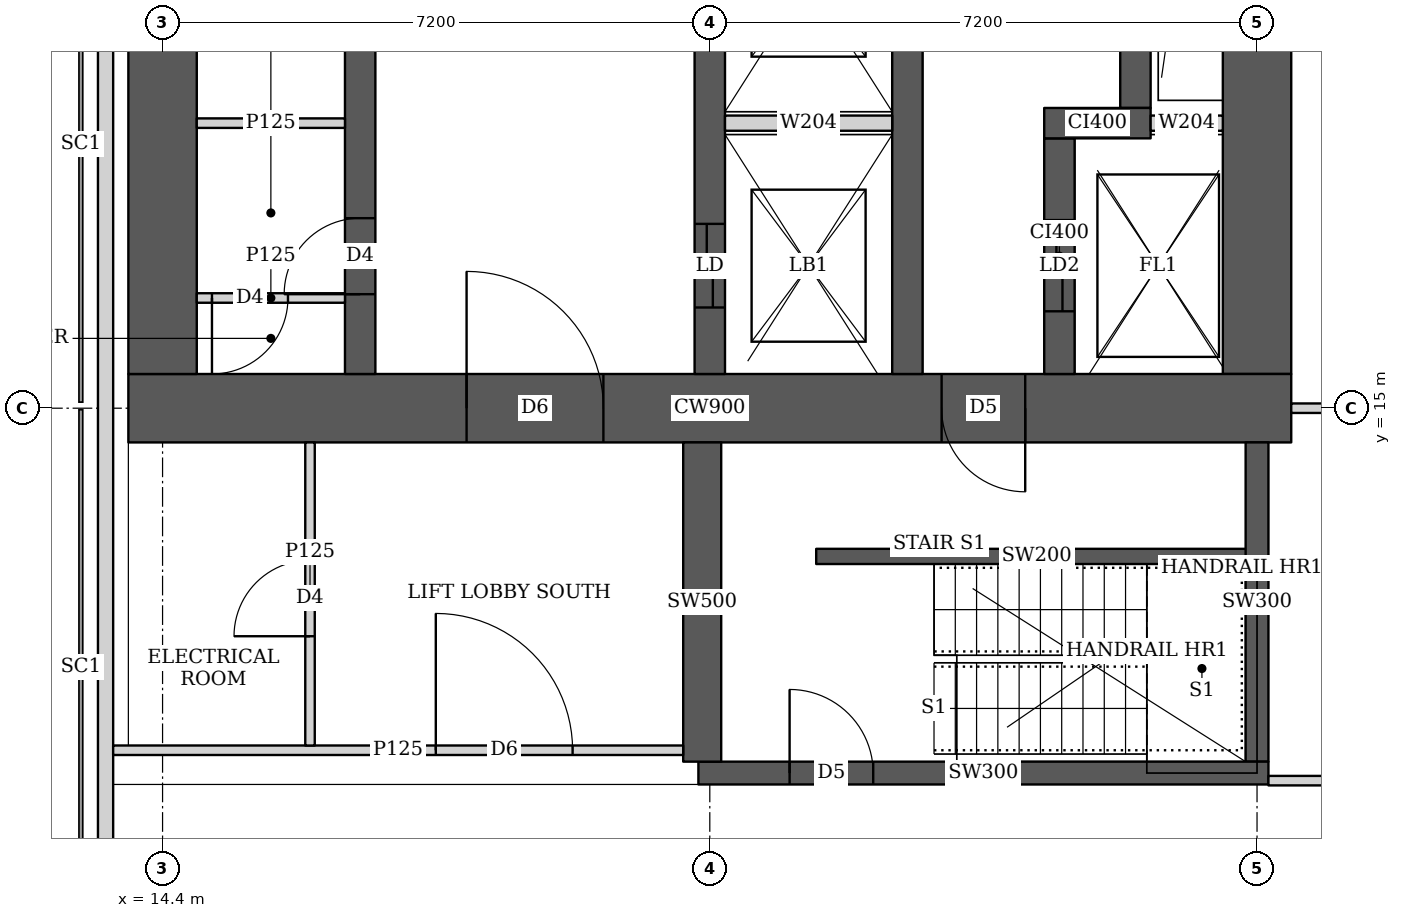
"""IFC4 building model, lengths in metres.
Left out: names, types, materials, properties, quantities, classifications, styles, units other than length and angle.
Written with IfcOpenShell. Run it as: python <this file> out.ifc"""

import sys

from ifc_helpers import new_model, si_unit, direction, frame, frame_2d, origin, place, context, subcontext, project, spatial, rectangle, extrude, element, fill, save


model = new_model("IFC4")
c1 = context("Model", 3, precision=1e-05, world=origin(), true_north=direction((0.0, 1.0)))
c2 = subcontext(c1, "Body", "Model", "MODEL_VIEW")
j1 = project(units=[si_unit("LENGTHUNIT", "METRE"), si_unit("PLANEANGLEUNIT", "RADIAN")], contexts=[c1])
p1 = place(None, origin())
s1 = spatial("IfcSite", under=j1, at=p1, CompositionType="ELEMENT")
p2 = place(p1, origin())
s2 = spatial("IfcBuilding", under=s1, at=p2, CompositionType="ELEMENT")
p3 = place(p2, frame((0.0, 0.0, 262.85)))
s3 = spatial("IfcBuildingStorey", under=s2, at=p3, CompositionType="ELEMENT", Elevation=262.85)
p4 = place(p3, frame((13.95, 15.0, 0.0), z_axis=(0.0, 0.0, 1.0), x_axis=(1.0, 0.0, 0.0)))
e1 = element("IfcWall", 1, at=p4, inside=s3, PredefinedType="SHEAR", context=c2, shape_type="SweptSolid", body=[
    extrude(rectangle(XDim=15.3, YDim=0.9, at=frame_2d((7.65, 0.0))), origin(), (0.0, 0.0, 1.0), 3.75),
])
p5 = place(p4, frame((4.45, 0.0, 0.0)))
e2 = element("IfcOpeningElement", 2, at=p5, cuts=e1, PredefinedType="OPENING", context=c2, shape_type="SweptSolid", body=[
    extrude(rectangle(XDim=1.8, YDim=2.1, at=frame_2d((0.9, 1.05))), frame((0.0, 0.46, 0.0), z_axis=(0.0, -1.0, 0.0), x_axis=(1.0, 0.0, 0.0)), (0.0, 0.0, 1.0), 0.92),
])
p6 = place(p4, frame((10.7, 0.0, 0.0)))
e3 = element("IfcOpeningElement", 3, at=p6, cuts=e1, PredefinedType="OPENING", context=c2, shape_type="SweptSolid", body=[
    extrude(rectangle(XDim=1.1, YDim=2.1, at=frame_2d((0.55, 1.05))), frame((0.0, 0.46, 0.0), z_axis=(0.0, -1.0, 0.0), x_axis=(1.0, 0.0, 0.0)), (0.0, 0.0, 1.0), 0.92),
])
for number, where, z_axis, x_axis in (
    (4, (14.4, 15.45, 0.0), (0.0, 0.0, 1.0), (0.0, 1.0, 0.0)),
    (5, (28.8, 15.45, 0.0), (0.0, 0.0, 1.0), (0.0, 1.0, 0.0)),
):
    element("IfcWall", number, at=place(p3, frame(where, z_axis=z_axis, x_axis=x_axis)), inside=s3, PredefinedType="SHEAR", context=c2, shape_type="SweptSolid", body=[
        extrude(rectangle(XDim=14.1, YDim=0.9, at=frame_2d((7.05, 0.0))), origin(), (0.0, 0.0, 1.0), 3.75),
    ])
p7 = place(p3, frame((17.0, 15.45, 0.0), z_axis=(0.0, 0.0, 1.0), x_axis=(0.0, 1.0, 0.0)))
e6 = element("IfcWall", 6, at=p7, inside=s3, PredefinedType="SHEAR", context=c2, shape_type="SweptSolid", body=[
    extrude(rectangle(XDim=14.1, YDim=0.4, at=frame_2d((7.05, 0.0))), origin(), (0.0, 0.0, 1.0), 3.75),
])
p8 = place(p7, frame((1.05, 0.0, 0.0)))
e7 = element("IfcOpeningElement", 7, at=p8, cuts=e6, PredefinedType="OPENING", context=c2, shape_type="SweptSolid", body=[
    extrude(rectangle(XDim=1.0, YDim=2.1, at=frame_2d((0.5, 1.05))), frame((0.0, 0.21, 0.0), z_axis=(0.0, -1.0, 0.0), x_axis=(1.0, 0.0, 0.0)), (0.0, 0.0, 1.0), 0.42),
])
p9 = place(p7, frame((4.675, 0.0, 0.0)))
e8 = element("IfcOpeningElement", 8, at=p9, cuts=e6, PredefinedType="OPENING", context=c2, shape_type="SweptSolid", body=[
    extrude(rectangle(XDim=1.0, YDim=2.1, at=frame_2d((0.5, 1.05))), frame((0.0, 0.21, 0.0), z_axis=(0.0, -1.0, 0.0), x_axis=(1.0, 0.0, 0.0)), (0.0, 0.0, 1.0), 0.42),
])
p10 = place(p7, frame((8.425, 0.0, 0.0)))
e9 = element("IfcOpeningElement", 9, at=p10, cuts=e6, PredefinedType="OPENING", context=c2, shape_type="SweptSolid", body=[
    extrude(rectangle(XDim=1.0, YDim=2.1, at=frame_2d((0.5, 1.05))), frame((0.0, 0.21, 0.0), z_axis=(0.0, -1.0, 0.0), x_axis=(1.0, 0.0, 0.0)), (0.0, 0.0, 1.0), 0.42),
])
p11 = place(p7, frame((12.175, 0.0, 0.0)))
e10 = element("IfcOpeningElement", 10, at=p11, cuts=e6, PredefinedType="OPENING", context=c2, shape_type="SweptSolid", body=[
    extrude(rectangle(XDim=1.0, YDim=2.1, at=frame_2d((0.5, 1.05))), frame((0.0, 0.21, 0.0), z_axis=(0.0, -1.0, 0.0), x_axis=(1.0, 0.0, 0.0)), (0.0, 0.0, 1.0), 0.42),
])
p12 = place(p3, frame((21.6, 15.45, 0.0), z_axis=(0.0, 0.0, 1.0), x_axis=(0.0, 1.0, 0.0)))
e11 = element("IfcWall", 11, at=p12, inside=s3, PredefinedType="SHEAR", context=c2, shape_type="SweptSolid", body=[
    extrude(rectangle(XDim=14.1, YDim=0.4, at=frame_2d((7.05, 0.0))), origin(), (0.0, 0.0, 1.0), 3.75),
])
p13 = place(p12, frame((0.875, 0.0, 0.0)))
e12 = element("IfcOpeningElement", 12, at=p13, cuts=e11, PredefinedType="OPENING", context=c2, shape_type="SweptSolid", body=[
    extrude(rectangle(XDim=1.1, YDim=2.1, at=frame_2d((0.55, 1.05))), frame((0.0, 0.21, 0.0), z_axis=(0.0, -1.0, 0.0), x_axis=(1.0, 0.0, 0.0)), (0.0, 0.0, 1.0), 0.42),
])
p14 = place(p12, frame((4.625, 0.0, 0.0)))
e13 = element("IfcOpeningElement", 13, at=p14, cuts=e11, PredefinedType="OPENING", context=c2, shape_type="SweptSolid", body=[
    extrude(rectangle(XDim=1.1, YDim=2.1, at=frame_2d((0.55, 1.05))), frame((0.0, 0.21, 0.0), z_axis=(0.0, -1.0, 0.0), x_axis=(1.0, 0.0, 0.0)), (0.0, 0.0, 1.0), 0.42),
])
p15 = place(p12, frame((8.375, 0.0, 0.0)))
e14 = element("IfcOpeningElement", 14, at=p15, cuts=e11, PredefinedType="OPENING", context=c2, shape_type="SweptSolid", body=[
    extrude(rectangle(XDim=1.1, YDim=2.1, at=frame_2d((0.55, 1.05))), frame((0.0, 0.21, 0.0), z_axis=(0.0, -1.0, 0.0), x_axis=(1.0, 0.0, 0.0)), (0.0, 0.0, 1.0), 0.42),
])
p16 = place(p12, frame((12.125, 0.0, 0.0)))
e15 = element("IfcOpeningElement", 15, at=p16, cuts=e11, PredefinedType="OPENING", context=c2, shape_type="SweptSolid", body=[
    extrude(rectangle(XDim=1.1, YDim=2.1, at=frame_2d((0.55, 1.05))), frame((0.0, 0.21, 0.0), z_axis=(0.0, -1.0, 0.0), x_axis=(1.0, 0.0, 0.0)), (0.0, 0.0, 1.0), 0.42),
])
p17 = place(p3, frame((24.2, 15.45, 0.0), z_axis=(0.0, 0.0, 1.0), x_axis=(0.0, 1.0, 0.0)))
e16 = element("IfcWall", 16, at=p17, inside=s3, PredefinedType="SHEAR", context=c2, shape_type="SweptSolid", body=[
    extrude(rectangle(XDim=14.1, YDim=0.4, at=frame_2d((7.05, 0.0))), origin(), (0.0, 0.0, 1.0), 3.75),
])
p18 = place(p3, frame((26.2, 15.45, 0.0), z_axis=(0.0, 0.0, 1.0), x_axis=(0.0, 1.0, 0.0)))
e17 = element("IfcWall", 17, at=p18, inside=s3, PredefinedType="SHEAR", context=c2, shape_type="SweptSolid", body=[
    extrude(rectangle(XDim=3.1, YDim=0.4, at=frame_2d((1.55, 0.0))), origin(), (0.0, 0.0, 1.0), 3.75),
])
p19 = place(p18, frame((0.825, 0.0, 0.0)))
e18 = element("IfcOpeningElement", 18, at=p19, cuts=e17, PredefinedType="OPENING", context=c2, shape_type="SweptSolid", body=[
    extrude(rectangle(XDim=1.2, YDim=2.1, at=frame_2d((0.6, 1.05))), frame((0.0, 0.21, 0.0), z_axis=(0.0, -1.0, 0.0), x_axis=(1.0, 0.0, 0.0)), (0.0, 0.0, 1.0), 0.42),
])
p20 = place(p3, frame((26.0, 18.75, 0.0), z_axis=(0.0, 0.0, 1.0), x_axis=(1.0, 0.0, 0.0)))
e19 = element("IfcWall", 19, at=p20, inside=s3, PredefinedType="SHEAR", context=c2, shape_type="SweptSolid", body=[
    extrude(rectangle(XDim=1.4, YDim=0.4, at=frame_2d((0.7, 0.0))), origin(), (0.0, 0.0, 1.0), 3.75),
])
p21 = place(p3, frame((27.2, 18.95, 0.0), z_axis=(0.0, 0.0, 1.0), x_axis=(0.0, 1.0, 0.0)))
e20 = element("IfcWall", 20, at=p21, inside=s3, PredefinedType="SHEAR", context=c2, shape_type="SweptSolid", body=[
    extrude(rectangle(XDim=7.1, YDim=0.4, at=frame_2d((3.55, 0.0))), origin(), (0.0, 0.0, 1.0), 3.75),
])
p22 = place(p3, frame((21.45, 10.2, 0.0), z_axis=(0.0, 0.0, 1.0), x_axis=(1.0, 0.0, 0.0)))
e21 = element("IfcWall", 21, at=p22, inside=s3, PredefinedType="SHEAR", context=c2, shape_type="SweptSolid", body=[
    extrude(rectangle(XDim=7.5, YDim=0.3, at=frame_2d((3.75, 0.0))), origin(), (0.0, 0.0, 1.0), 3.75),
])
p23 = place(p22, frame((1.2, 0.0, 0.0)))
e22 = element("IfcOpeningElement", 22, at=p23, cuts=e21, PredefinedType="OPENING", context=c2, shape_type="SweptSolid", body=[
    extrude(rectangle(XDim=1.1, YDim=2.1, at=frame_2d((0.55, 1.05))), frame((0.0, 0.16, 0.0), z_axis=(0.0, -1.0, 0.0), x_axis=(1.0, 0.0, 0.0)), (0.0, 0.0, 1.0), 0.32),
])
p24 = place(p3, frame((21.5, 10.35, 0.0), z_axis=(0.0, 0.0, 1.0), x_axis=(0.0, 1.0, 0.0)))
e23 = element("IfcWall", 23, at=p24, inside=s3, PredefinedType="SHEAR", context=c2, shape_type="SweptSolid", body=[
    extrude(rectangle(XDim=4.2, YDim=0.5, at=frame_2d((2.1, 0.0))), origin(), (0.0, 0.0, 1.0), 3.75),
])
p25 = place(p3, frame((28.8, 10.35, 0.0), z_axis=(0.0, 0.0, 1.0), x_axis=(0.0, 1.0, 0.0)))
e24 = element("IfcWall", 24, at=p25, inside=s3, PredefinedType="SHEAR", context=c2, shape_type="SweptSolid", body=[
    extrude(rectangle(XDim=4.2, YDim=0.3, at=frame_2d((2.1, 0.0))), origin(), (0.0, 0.0, 1.0), 3.75),
])
p26 = place(p3, frame((13.65, 43.037, 0.0), z_axis=(0.0, 0.0, 1.0), x_axis=(0.0, -1.0, 0.0)))
e25 = element("IfcWall", 25, at=p26, inside=s3, PredefinedType="SOLIDWALL", context=c2, shape_type="SweptSolid", body=[
    extrude(rectangle(XDim=35.374, YDim=0.2, at=frame_2d((17.687, 0.0))), origin(), (0.0, 0.0, 1.0), 3.5),
])
p27 = place(p26, frame((1.959, 0.0, 0.9)))
e26 = element("IfcOpeningElement", 26, at=p27, cuts=e25, PredefinedType="OPENING", context=c2, shape_type="SweptSolid", body=[
    extrude(rectangle(XDim=1.8, YDim=1.5, at=frame_2d((0.9, 0.75))), frame((0.0, 0.11, 0.0), z_axis=(0.0, -1.0, 0.0), x_axis=(1.0, 0.0, 0.0)), (0.0, 0.0, 1.0), 0.22),
])
p28 = place(p3, frame((13.75, 10.5, 0.0), z_axis=(0.0, 0.0, 1.0), x_axis=(1.0, 0.0, 0.0)))
e27 = element("IfcWall", 27, at=p28, inside=s3, PredefinedType="PARTITIONING", context=c2, shape_type="SweptSolid", body=[
    extrude(rectangle(XDim=7.5, YDim=0.125, at=frame_2d((3.75, 0.0))), origin(), (0.0, 0.0, 1.0), 3.5),
])
p29 = place(p28, frame((4.245, 0.0, 0.0)))
e28 = element("IfcOpeningElement", 28, at=p29, cuts=e27, PredefinedType="OPENING", context=c2, shape_type="SweptSolid", body=[
    extrude(rectangle(XDim=1.8, YDim=2.1, at=frame_2d((0.9, 1.05))), frame((0.0, 0.073, 0.0), z_axis=(0.0, -1.0, 0.0), x_axis=(1.0, 0.0, 0.0)), (0.0, 0.0, 1.0), 0.145),
])
p30 = place(p3, frame((16.34, 10.562, 0.0), z_axis=(0.0, 0.0, 1.0), x_axis=(0.0, 1.0, 0.0)))
e29 = element("IfcWall", 29, at=p30, inside=s3, PredefinedType="PARTITIONING", context=c2, shape_type="SweptSolid", body=[
    extrude(rectangle(XDim=3.988, YDim=0.125, at=frame_2d((1.994, 0.0))), origin(), (0.0, 0.0, 1.0), 3.5),
])
p31 = place(p30, frame((1.438, 0.0, 0.0)))
e30 = element("IfcOpeningElement", 30, at=p31, cuts=e29, PredefinedType="OPENING", context=c2, shape_type="SweptSolid", body=[
    extrude(rectangle(XDim=1.0, YDim=2.1, at=frame_2d((0.5, 1.05))), frame((0.0, 0.073, 0.0), z_axis=(0.0, -1.0, 0.0), x_axis=(1.0, 0.0, 0.0)), (0.0, 0.0, 1.0), 0.145),
])
p32 = place(p3, frame((28.95, 10.1, 0.0), z_axis=(0.0, 0.0, 1.0), x_axis=(1.0, 0.0, 0.0)))
e31 = element("IfcWall", 31, at=p32, inside=s3, PredefinedType="PARTITIONING", context=c2, shape_type="SweptSolid", body=[
    extrude(rectangle(XDim=9.188, YDim=0.125, at=frame_2d((4.594, 0.0))), origin(), (0.0, 0.0, 1.0), 3.5),
])
p33 = place(p3, frame((29.25, 15.0, 0.0), z_axis=(0.0, 0.0, 1.0), x_axis=(1.0, 0.0, 0.0)))
e32 = element("IfcWall", 32, at=p33, inside=s3, PredefinedType="PARTITIONING", context=c2, shape_type="SweptSolid", body=[
    extrude(rectangle(XDim=6.049, YDim=0.125, at=frame_2d((3.024, 0.0))), origin(), (0.0, 0.0, 1.0), 3.5),
])
p34 = place(p3, frame((14.85, 16.45, 0.0), z_axis=(0.0, 0.0, 1.0), x_axis=(1.0, 0.0, 0.0)))
e33 = element("IfcWall", 33, at=p34, inside=s3, PredefinedType="PARTITIONING", context=c2, shape_type="SweptSolid", body=[
    extrude(rectangle(XDim=1.95, YDim=0.125, at=frame_2d((0.975, 0.0))), origin(), (0.0, 0.0, 1.0), 3.5),
])
p35 = place(p34, frame((0.2, 0.0, 0.0)))
e34 = element("IfcOpeningElement", 34, at=p35, cuts=e33, PredefinedType="OPENING", context=c2, shape_type="SweptSolid", body=[
    extrude(rectangle(XDim=1.0, YDim=2.1, at=frame_2d((0.5, 1.05))), frame((0.0, 0.073, 0.0), z_axis=(0.0, -1.0, 0.0), x_axis=(1.0, 0.0, 0.0)), (0.0, 0.0, 1.0), 0.145),
])
p36 = place(p3, frame((14.85, 18.75, 0.0), z_axis=(0.0, 0.0, 1.0), x_axis=(1.0, 0.0, 0.0)))
e35 = element("IfcWall", 35, at=p36, inside=s3, PredefinedType="PARTITIONING", context=c2, shape_type="SweptSolid", body=[
    extrude(rectangle(XDim=1.95, YDim=0.125, at=frame_2d((0.975, 0.0))), origin(), (0.0, 0.0, 1.0), 3.5),
])
p37 = place(p3, frame((23.0, 13.05, 0.0), z_axis=(0.0, 0.0, 1.0), x_axis=(1.0, 0.0, 0.0)))
e36 = element("IfcWall", 36, at=p37, inside=s3, PredefinedType="SHEAR", context=c2, shape_type="SweptSolid", body=[
    extrude(rectangle(XDim=5.8, YDim=0.2, at=frame_2d((2.9, 0.0))), origin(), (0.0, 0.0, 1.0), 3.75),
])
p38 = place(p3, frame((21.8, 18.75, 0.0), z_axis=(0.0, 0.0, 1.0), x_axis=(1.0, 0.0, 0.0)))
e37 = element("IfcWall", 37, at=p38, inside=s3, PredefinedType="SOLIDWALL", context=c2, shape_type="SweptSolid", body=[
    extrude(rectangle(XDim=2.2, YDim=0.2, at=frame_2d((1.1, 0.0))), origin(), (0.0, 0.0, 1.0), 3.5),
])
p39 = place(p3, frame((27.4, 18.75, 0.0), z_axis=(0.0, 0.0, 1.0), x_axis=(1.0, 0.0, 0.0)))
e38 = element("IfcWall", 38, at=p39, inside=s3, PredefinedType="SOLIDWALL", context=c2, shape_type="SweptSolid", body=[
    extrude(rectangle(XDim=0.95, YDim=0.2, at=frame_2d((0.475, 0.0))), origin(), (0.0, 0.0, 1.0), 3.5),
])
p40 = place(p31, origin())
e39 = element("IfcDoor", 39, at=p40, inside=s3, OperationType="SINGLE_SWING_LEFT", PredefinedType="DOOR", context=c2, shape_type="SweptSolid", body=[
    extrude(rectangle(XDim=1.0, YDim=2.1, at=frame_2d((0.5, 1.05))), frame((0.0, 0.025, 0.0), z_axis=(0.0, -1.0, 0.0), x_axis=(1.0, 0.0, 0.0)), (0.0, 0.0, 1.0), 0.05),
])
fill(e30, e39)
p41 = place(p29, origin())
e40 = element("IfcDoor", 40, at=p41, inside=s3, OperationType="DOUBLE_DOOR_SINGLE_SWING", PredefinedType="DOOR", context=c2, shape_type="SweptSolid", body=[
    extrude(rectangle(XDim=1.8, YDim=2.1, at=frame_2d((0.9, 1.05))), frame((0.0, 0.025, 0.0), z_axis=(0.0, -1.0, 0.0), x_axis=(1.0, 0.0, 0.0)), (0.0, 0.0, 1.0), 0.05),
])
fill(e28, e40)
p42 = place(p35, origin())
e41 = element("IfcDoor", 41, at=p42, inside=s3, OperationType="SINGLE_SWING_RIGHT", PredefinedType="DOOR", context=c2, shape_type="SweptSolid", body=[
    extrude(rectangle(XDim=1.0, YDim=2.1, at=frame_2d((0.5, 1.05))), frame((0.0, 0.025, 0.0), z_axis=(0.0, -1.0, 0.0), x_axis=(1.0, 0.0, 0.0)), (0.0, 0.0, 1.0), 0.05),
])
fill(e34, e41)
p43 = place(p8, origin())
e42 = element("IfcDoor", 42, at=p43, inside=s3, OperationType="SINGLE_SWING_LEFT", PredefinedType="DOOR", context=c2, shape_type="SweptSolid", body=[
    extrude(rectangle(XDim=1.0, YDim=2.1, at=frame_2d((0.5, 1.05))), frame((0.0, 0.025, 0.0), z_axis=(0.0, -1.0, 0.0), x_axis=(1.0, 0.0, 0.0)), (0.0, 0.0, 1.0), 0.05),
])
fill(e7, e42)
p44 = place(p5, origin())
e43 = element("IfcDoor", 43, at=p44, inside=s3, OperationType="DOUBLE_DOOR_SINGLE_SWING", PredefinedType="DOOR", context=c2, shape_type="SweptSolid", body=[
    extrude(rectangle(XDim=1.8, YDim=2.1, at=frame_2d((0.9, 1.05))), frame((0.0, 0.025, 0.0), z_axis=(0.0, -1.0, 0.0), x_axis=(1.0, 0.0, 0.0)), (0.0, 0.0, 1.0), 0.05),
])
fill(e2, e43)
p45 = place(p6, origin())
e44 = element("IfcDoor", 44, at=p45, inside=s3, OperationType="SINGLE_SWING_LEFT", PredefinedType="DOOR", context=c2, shape_type="SweptSolid", body=[
    extrude(rectangle(XDim=1.1, YDim=2.1, at=frame_2d((0.55, 1.05))), frame((0.0, 0.025, 0.0), z_axis=(0.0, -1.0, 0.0), x_axis=(1.0, 0.0, 0.0)), (0.0, 0.0, 1.0), 0.05),
])
fill(e3, e44)
p46 = place(p19, origin())
e45 = element("IfcDoor", 45, at=p46, inside=s3, OperationType="DOUBLE_DOOR_SLIDING", PredefinedType="DOOR", context=c2, shape_type="SweptSolid", body=[
    extrude(rectangle(XDim=1.2, YDim=2.1, at=frame_2d((0.6, 1.05))), frame((0.0, 0.025, 0.0), z_axis=(0.0, -1.0, 0.0), x_axis=(1.0, 0.0, 0.0)), (0.0, 0.0, 1.0), 0.05),
])
fill(e18, e45)
p47 = place(p13, origin())
e46 = element("IfcDoor", 46, at=p47, inside=s3, OperationType="DOUBLE_DOOR_SLIDING", PredefinedType="DOOR", context=c2, shape_type="SweptSolid", body=[
    extrude(rectangle(XDim=1.1, YDim=2.1, at=frame_2d((0.55, 1.05))), frame((0.0, 0.025, 0.0), z_axis=(0.0, -1.0, 0.0), x_axis=(1.0, 0.0, 0.0)), (0.0, 0.0, 1.0), 0.05),
])
fill(e12, e46)
p48 = place(p23, origin())
e47 = element("IfcDoor", 47, at=p48, inside=s3, OperationType="SINGLE_SWING_LEFT", PredefinedType="DOOR", context=c2, shape_type="SweptSolid", body=[
    extrude(rectangle(XDim=1.1, YDim=2.1, at=frame_2d((0.55, 1.05))), frame((0.0, 0.025, 0.0), z_axis=(0.0, -1.0, 0.0), x_axis=(1.0, 0.0, 0.0)), (0.0, 0.0, 1.0), 0.05),
])
fill(e22, e47)
save(model, sys.argv[1])
